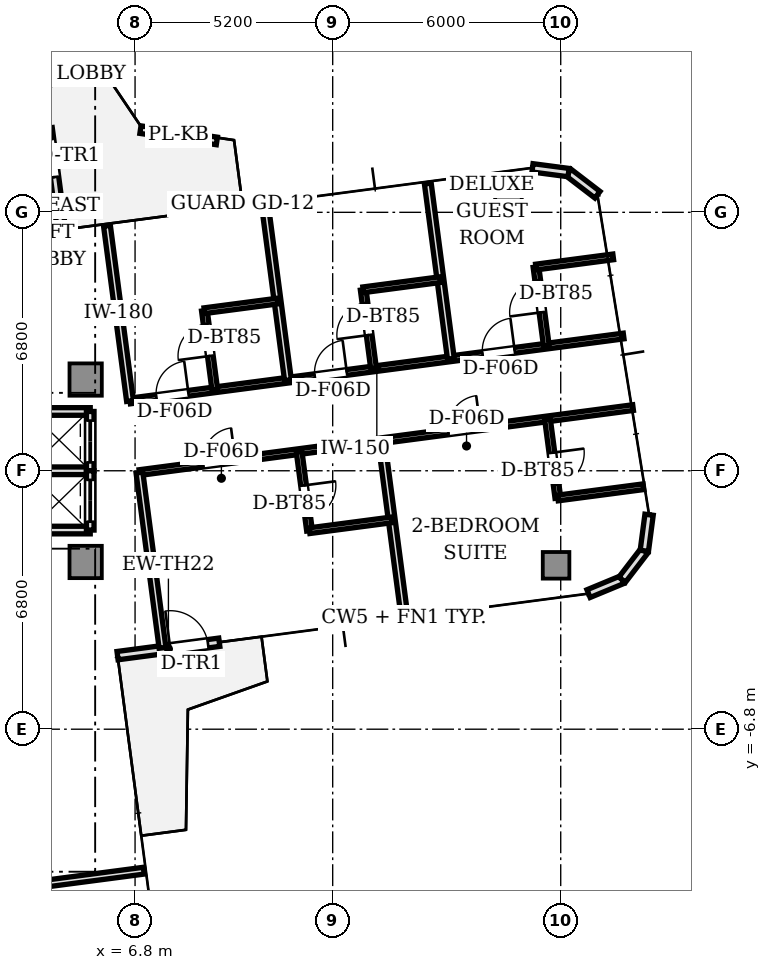
"""IFC4 building model, lengths in metres.
Left out: names, types, materials, properties, quantities, classifications, styles, units other than length and angle.
Written with IfcOpenShell. Run it as: python <this file> out.ifc"""

import sys

from ifc_helpers import new_model, si_unit, direction, frame, frame_2d, origin, origin_2d, place, context, subcontext, project, spatial, rectangle, extrude, source, transform, mapped, element, fill, save


model = new_model("IFC4")
c1 = context("Model", 3, precision=1e-05, world=origin(), true_north=direction((0.0, 1.0)))
c2 = subcontext(c1, "Body", "Model", "MODEL_VIEW")
j1 = project(units=[si_unit("LENGTHUNIT", "METRE"), si_unit("PLANEANGLEUNIT", "RADIAN")], contexts=[c1])
p1 = place(None, origin())
s1 = spatial("IfcSite", under=j1, at=p1, CompositionType="ELEMENT")
p2 = place(p1, origin())
s2 = spatial("IfcBuilding", under=s1, at=p2, CompositionType="ELEMENT")
p3 = place(p2, frame((0.0, 0.0, 206.5)))
s3 = spatial("IfcBuildingStorey", under=s2, at=p3, CompositionType="ELEMENT", Elevation=206.5)
m1 = source(origin(), c2, "Body", "SweptSolid", [
    extrude(rectangle(XDim=0.85, YDim=0.85, at=origin_2d()), origin(), (0.0, 0.0, 1.0), 3.11),
])
for number, where, z_axis, x_axis in (
    (1, (5.5, 2.4, 0.0), (0.0, 0.0, 1.0), (1.0, 0.0, 0.0)),
    (2, (5.5, -2.4, 0.0), (0.0, 0.0, 1.0), (1.0, 0.0, 0.0)),
):
    element("IfcColumn", number, at=place(p3, frame(where, z_axis=z_axis, x_axis=x_axis)), inside=s3, PredefinedType="COLUMN", context=c2, shape_type="MappedRepresentation", body=[
        mapped(m1, transform((0.0, 0.0, 0.0), scale=1.0)),
    ])
m2 = source(origin(), c2, "Body", "SweptSolid", [
    extrude(rectangle(XDim=0.7, YDim=0.7, at=origin_2d()), origin(), (0.0, 0.0, 1.0), 3.11),
])
for number, where, z_axis, x_axis in (
    (3, (17.878, -2.488, 0.0), (0.0, 0.0, 1.0), (1.0, 0.0, 0.0)),
    (4, (16.625, 7.03, 0.0), (0.0, 0.0, 1.0), (1.0, 0.0, 0.0)),
):
    element("IfcColumn", number, at=place(p3, frame(where, z_axis=z_axis, x_axis=x_axis)), inside=s3, PredefinedType="COLUMN", context=c2, shape_type="MappedRepresentation", body=[
        mapped(m2, transform((0.0, 0.0, 0.0), scale=1.0)),
    ])
p4 = place(p3, frame((6.339, -4.864, 0.0), z_axis=(0.0, 0.0, 1.0), x_axis=(0.991439824936, 0.130564442062, 0.0)))
e5 = element("IfcWall", 5, at=p4, inside=s3, PredefinedType="STANDARD", context=c2, shape_type="SweptSolid", body=[
    extrude(rectangle(XDim=2.7, YDim=0.22, at=frame_2d((1.35, 0.0))), origin(), (0.0, 0.0, 1.0), 3.11),
])
p5 = place(p4, frame((1.4, 0.0, 0.0)))
e6 = element("IfcOpeningElement", 6, at=p5, cuts=e5, PredefinedType="OPENING", context=c2, shape_type="SweptSolid", body=[
    extrude(rectangle(XDim=1.0, YDim=2.2, at=frame_2d((0.5, 1.1))), frame((0.0, 0.12, 0.0), z_axis=(0.0, -1.0, 0.0), x_axis=(1.0, 0.0, 0.0)), (0.0, 0.0, 1.0), 0.24),
])
for number, where, z_axis, x_axis in (
    (7, (18.732, -3.233, 0.0), (0.0, 0.0, 1.0), (0.924, 0.383, 0.0)),
    (8, (19.617, -2.866, 0.0), (0.0, 0.0, 1.0), (0.609, 0.793, 0.0)),
    (9, (20.2, -2.106, 0.0), (0.0, 0.0, 1.0), (0.131, 0.991, 0.0)),
):
    element("IfcWall", number, at=place(p3, frame(where, z_axis=z_axis, x_axis=x_axis)), inside=s3, PredefinedType="STANDARD", context=c2, shape_type="SweptSolid", body=[
        extrude(rectangle(XDim=0.958, YDim=0.22, at=frame_2d((0.479, 0.0))), origin(), (0.0, 0.0, 1.0), 3.11),
    ])
p6 = place(p3, frame((18.966, 7.263, 0.0), z_axis=(0.0, 0.0, 1.0), x_axis=(-0.793249178392, 0.608897151398, 0.0)))
e10 = element("IfcWall", 10, at=p6, inside=s3, PredefinedType="STANDARD", context=c2, shape_type="SweptSolid", body=[
    extrude(rectangle(XDim=0.958, YDim=0.22, at=frame_2d((0.479, 0.0))), origin(), (0.0, 0.0, 1.0), 3.11),
])
p7 = place(p3, frame((18.207, 7.846, 0.0), z_axis=(0.0, 0.0, 1.0), x_axis=(-0.991444747987, 0.130527053476, 0.0)))
e11 = element("IfcWall", 11, at=p7, inside=s3, PredefinedType="STANDARD", context=c2, shape_type="SweptSolid", body=[
    extrude(rectangle(XDim=0.958, YDim=0.22, at=frame_2d((0.479, 0.0))), origin(), (0.0, 0.0, 1.0), 3.11),
])
p8 = place(p3, frame((4.864, 6.339, 0.0), z_axis=(0.0, 0.0, 1.0), x_axis=(-0.130564442062, 0.991439824936, 0.0)))
e12 = element("IfcWall", 12, at=p8, inside=s3, PredefinedType="STANDARD", context=c2, shape_type="SweptSolid", body=[
    extrude(rectangle(XDim=2.7, YDim=0.22, at=frame_2d((1.35, 0.0))), origin(), (0.0, 0.0, 1.0), 3.11),
])
p9 = place(p8, frame((1.4, 0.0, 0.0)))
e13 = element("IfcOpeningElement", 13, at=p9, cuts=e12, PredefinedType="OPENING", context=c2, shape_type="SweptSolid", body=[
    extrude(rectangle(XDim=1.0, YDim=2.2, at=frame_2d((0.5, 1.1))), frame((0.0, 0.12, 0.0), z_axis=(0.0, -1.0, 0.0), x_axis=(1.0, 0.0, 0.0)), (0.0, 0.0, 1.0), 0.24),
])
p10 = place(p3, frame((8.952, 8.678, 0.0), z_axis=(0.0, 0.0, 1.0), x_axis=(-0.989233117848, 0.146348346598, 0.0)))
e14 = element("IfcWall", 14, at=p10, inside=s3, PredefinedType="PARAPET", context=c2, shape_type="SweptSolid", body=[
    extrude(rectangle(XDim=2.032, YDim=0.2, at=frame_2d((1.016, 0.0))), origin(), (0.0, 0.0, 1.0), 0.65),
])
for number, where, z_axis, x_axis in (
    (15, (3.98, 1.56, 0.0), (0.0, 0.0, 1.0), (1.0, 0.0, 0.0)),
    (16, (3.98, -1.56, 0.0), (0.0, 0.0, 1.0), (1.0, 0.0, 0.0)),
    (17, (3.98, 0.0, 0.0), (0.0, 0.0, 1.0), (1.0, 0.0, 0.0)),
):
    element("IfcWall", number, at=place(p3, frame(where, z_axis=z_axis, x_axis=x_axis)), inside=s3, PredefinedType="SOLIDWALL", context=c2, shape_type="SweptSolid", body=[
        extrude(rectangle(XDim=1.64, YDim=0.2, at=frame_2d((0.82, 0.0))), origin(), (0.0, 0.0, 1.0), 2.66),
    ])
p11 = place(p3, frame((5.62, 0.0, 0.0), z_axis=(0.0, 0.0, 1.0), x_axis=(0.0, 1.0, 0.0)))
e18 = element("IfcWall", 18, at=p11, inside=s3, PredefinedType="SOLIDWALL", context=c2, shape_type="SweptSolid", body=[
    extrude(rectangle(XDim=1.56, YDim=0.2, at=frame_2d((0.78, 0.0))), origin(), (0.0, 0.0, 1.0), 2.66),
])
p12 = place(p11, frame((0.22, 0.0, 0.0)))
e19 = element("IfcOpeningElement", 19, at=p12, cuts=e18, PredefinedType="OPENING", context=c2, shape_type="SweptSolid", body=[
    extrude(rectangle(XDim=1.1, YDim=2.2, at=frame_2d((0.55, 1.1))), frame((0.0, 0.11, 0.0), z_axis=(0.0, -1.0, 0.0), x_axis=(1.0, 0.0, 0.0)), (0.0, 0.0, 1.0), 0.22),
])
p13 = place(p3, frame((5.62, -1.56, 0.0), z_axis=(0.0, 0.0, 1.0), x_axis=(0.0, 1.0, 0.0)))
e20 = element("IfcWall", 20, at=p13, inside=s3, PredefinedType="SOLIDWALL", context=c2, shape_type="SweptSolid", body=[
    extrude(rectangle(XDim=1.56, YDim=0.2, at=frame_2d((0.78, 0.0))), origin(), (0.0, 0.0, 1.0), 2.66),
])
p14 = place(p13, frame((0.22, 0.0, 0.0)))
e21 = element("IfcOpeningElement", 21, at=p14, cuts=e20, PredefinedType="OPENING", context=c2, shape_type="SweptSolid", body=[
    extrude(rectangle(XDim=1.1, YDim=2.2, at=frame_2d((0.55, 1.1))), frame((0.0, 0.11, 0.0), z_axis=(0.0, -1.0, 0.0), x_axis=(1.0, 0.0, 0.0)), (0.0, 0.0, 1.0), 0.22),
])
p15 = place(p3, frame((6.667, 1.836, 0.0), z_axis=(0.0, 0.0, 1.0), x_axis=(0.991444016182, 0.130532611928, 0.0)))
e22 = element("IfcWall", 22, at=p15, inside=s3, PredefinedType="PARTITIONING", context=c2, shape_type="SweptSolid", body=[
    extrude(rectangle(XDim=13.1, YDim=0.15, at=frame_2d((6.55, 0.0))), origin(), (0.0, 0.0, 1.0), 2.66),
])
p16 = place(p15, frame((0.7, 0.0, 0.0)))
e23 = element("IfcOpeningElement", 23, at=p16, cuts=e22, PredefinedType="OPENING", context=c2, shape_type="SweptSolid", body=[
    extrude(rectangle(XDim=0.85, YDim=2.1, at=frame_2d((0.425, 1.05))), frame((0.0, 0.085, 0.0), z_axis=(0.0, -1.0, 0.0), x_axis=(1.0, 0.0, 0.0)), (0.0, 0.0, 1.0), 0.17),
])
p17 = place(p15, frame((4.904, 0.0, 0.0)))
e24 = element("IfcOpeningElement", 24, at=p17, cuts=e22, PredefinedType="OPENING", context=c2, shape_type="SweptSolid", body=[
    extrude(rectangle(XDim=0.85, YDim=2.1, at=frame_2d((0.425, 1.05))), frame((0.0, 0.085, 0.0), z_axis=(0.0, -1.0, 0.0), x_axis=(1.0, 0.0, 0.0)), (0.0, 0.0, 1.0), 0.17),
])
p18 = place(p15, frame((9.357, 0.0, 0.0)))
e25 = element("IfcOpeningElement", 25, at=p18, cuts=e22, PredefinedType="OPENING", context=c2, shape_type="SweptSolid", body=[
    extrude(rectangle(XDim=0.85, YDim=2.1, at=frame_2d((0.425, 1.05))), frame((0.0, 0.085, 0.0), z_axis=(0.0, -1.0, 0.0), x_axis=(1.0, 0.0, 0.0)), (0.0, 0.0, 1.0), 0.17),
])
p19 = place(p3, frame((6.915, -0.048, 0.0), z_axis=(0.0, 0.0, 1.0), x_axis=(0.991444333722, 0.130530200068, 0.0)))
e26 = element("IfcWall", 26, at=p19, inside=s3, PredefinedType="PARTITIONING", context=c2, shape_type="SweptSolid", body=[
    extrude(rectangle(XDim=13.1, YDim=0.15, at=frame_2d((6.55, 0.0))), origin(), (0.0, 0.0, 1.0), 2.66),
])
p20 = place(p19, frame((1.693, 0.0, 0.0)))
e27 = element("IfcOpeningElement", 27, at=p20, cuts=e26, PredefinedType="OPENING", context=c2, shape_type="SweptSolid", body=[
    extrude(rectangle(XDim=0.85, YDim=2.1, at=frame_2d((0.425, 1.05))), frame((0.0, 0.085, 0.0), z_axis=(0.0, -1.0, 0.0), x_axis=(1.0, 0.0, 0.0)), (0.0, 0.0, 1.0), 0.17),
])
p21 = place(p19, frame((8.199, 0.0, 0.0)))
e28 = element("IfcOpeningElement", 28, at=p21, cuts=e26, PredefinedType="OPENING", context=c2, shape_type="SweptSolid", body=[
    extrude(rectangle(XDim=0.85, YDim=2.1, at=frame_2d((0.425, 1.05))), frame((0.0, 0.085, 0.0), z_axis=(0.0, -1.0, 0.0), x_axis=(1.0, 0.0, 0.0)), (0.0, 0.0, 1.0), 0.17),
])
p22 = place(p3, frame((6.667, 1.836, 0.0), z_axis=(0.0, 0.0, 1.0), x_axis=(-0.13051970184, 0.991445715827, 0.0)))
e29 = element("IfcWall", 29, at=p22, inside=s3, PredefinedType="PARTITIONING", context=c2, shape_type="SweptSolid", body=[
    extrude(rectangle(XDim=4.65, YDim=0.18, at=frame_2d((2.325, 0.0))), origin(), (0.0, 0.0, 1.0), 2.66),
])
p23 = place(p3, frame((7.522, -4.658, 0.0), z_axis=(0.0, 0.0, 1.0), x_axis=(-0.130526496103, 0.991444821367, 0.0)))
e30 = element("IfcWall", 30, at=p23, inside=s3, PredefinedType="PARTITIONING", context=c2, shape_type="SweptSolid", body=[
    extrude(rectangle(XDim=4.65, YDim=0.18, at=frame_2d((2.325, 0.0))), origin(), (0.0, 0.0, 1.0), 2.66),
])
p24 = place(p3, frame((10.823, 2.383, 0.0), z_axis=(0.0, 0.0, 1.0), x_axis=(-0.13051970184, 0.991445715827, 0.0)))
e31 = element("IfcWall", 31, at=p24, inside=s3, PredefinedType="PARTITIONING", context=c2, shape_type="SweptSolid", body=[
    extrude(rectangle(XDim=4.65, YDim=0.18, at=frame_2d((2.325, 0.0))), origin(), (0.0, 0.0, 1.0), 2.66),
])
p25 = place(p3, frame((8.898, 2.13, 0.0), z_axis=(0.0, 0.0, 1.0), x_axis=(-0.130556761174, 0.991440836415, 0.0)))
e32 = element("IfcWall", 32, at=p25, inside=s3, PredefinedType="PARTITIONING", context=c2, shape_type="SweptSolid", body=[
    extrude(rectangle(XDim=2.1, YDim=0.15, at=frame_2d((1.05, 0.0))), origin(), (0.0, 0.0, 1.0), 2.66),
])
p26 = place(p25, frame((0.9, 0.0, 0.0)))
e33 = element("IfcOpeningElement", 33, at=p26, cuts=e32, PredefinedType="OPENING", context=c2, shape_type="SweptSolid", body=[
    extrude(rectangle(XDim=0.85, YDim=2.1, at=frame_2d((0.425, 1.05))), frame((0.0, 0.085, 0.0), z_axis=(0.0, -1.0, 0.0), x_axis=(1.0, 0.0, 0.0)), (0.0, 0.0, 1.0), 0.17),
])
p27 = place(p3, frame((8.624, 4.212, 0.0), z_axis=(0.0, 0.0, 1.0), x_axis=(0.991448303632, 0.130500043009, 0.0)))
e34 = element("IfcWall", 34, at=p27, inside=s3, PredefinedType="PARTITIONING", context=c2, shape_type="SweptSolid", body=[
    extrude(rectangle(XDim=1.942, YDim=0.15, at=frame_2d((0.971, 0.0))), origin(), (0.0, 0.0, 1.0), 2.66),
])
p28 = place(p3, frame((15.11, 2.948, 0.0), z_axis=(0.0, 0.0, 1.0), x_axis=(-0.130526496103, 0.991444821367, 0.0)))
e35 = element("IfcWall", 35, at=p28, inside=s3, PredefinedType="PARTITIONING", context=c2, shape_type="SweptSolid", body=[
    extrude(rectangle(XDim=4.65, YDim=0.18, at=frame_2d((2.325, 0.0))), origin(), (0.0, 0.0, 1.0), 2.66),
])
p29 = place(p3, frame((13.077, 2.68, 0.0), z_axis=(0.0, 0.0, 1.0), x_axis=(-0.130541714651, 0.991442817683, 0.0)))
e36 = element("IfcWall", 36, at=p29, inside=s3, PredefinedType="PARTITIONING", context=c2, shape_type="SweptSolid", body=[
    extrude(rectangle(XDim=2.1, YDim=0.15, at=frame_2d((1.05, 0.0))), origin(), (0.0, 0.0, 1.0), 2.66),
])
p30 = place(p29, frame((0.9, 0.0, 0.0)))
e37 = element("IfcOpeningElement", 37, at=p30, cuts=e36, PredefinedType="OPENING", context=c2, shape_type="SweptSolid", body=[
    extrude(rectangle(XDim=0.85, YDim=2.1, at=frame_2d((0.425, 1.05))), frame((0.0, 0.085, 0.0), z_axis=(0.0, -1.0, 0.0), x_axis=(1.0, 0.0, 0.0)), (0.0, 0.0, 1.0), 0.17),
])
p31 = place(p3, frame((12.803, 4.762, 0.0), z_axis=(0.0, 0.0, 1.0), x_axis=(0.991460374844, 0.130408301556, 0.0)))
e38 = element("IfcWall", 38, at=p31, inside=s3, PredefinedType="PARTITIONING", context=c2, shape_type="SweptSolid", body=[
    extrude(rectangle(XDim=2.05, YDim=0.15, at=frame_2d((1.025, 0.0))), origin(), (0.0, 0.0, 1.0), 2.66),
])
p32 = place(p3, frame((17.623, 3.278, 0.0), z_axis=(0.0, 0.0, 1.0), x_axis=(-0.13044248305, 0.9914558783, 0.0)))
e39 = element("IfcWall", 39, at=p32, inside=s3, PredefinedType="PARTITIONING", context=c2, shape_type="SweptSolid", body=[
    extrude(rectangle(XDim=2.1, YDim=0.15, at=frame_2d((1.05, 0.0))), origin(), (0.0, 0.0, 1.0), 2.66),
])
p33 = place(p32, frame((0.9, 0.0, 0.0)))
e40 = element("IfcOpeningElement", 40, at=p33, cuts=e39, PredefinedType="OPENING", context=c2, shape_type="SweptSolid", body=[
    extrude(rectangle(XDim=0.85, YDim=2.1, at=frame_2d((0.425, 1.05))), frame((0.0, 0.085, 0.0), z_axis=(0.0, -1.0, 0.0), x_axis=(1.0, 0.0, 0.0)), (0.0, 0.0, 1.0), 0.17),
])
p34 = place(p3, frame((17.349, 5.36, 0.0), z_axis=(0.0, 0.0, 1.0), x_axis=(0.991442940586, 0.130540781221, 0.0)))
e41 = element("IfcWall", 41, at=p34, inside=s3, PredefinedType="PARTITIONING", context=c2, shape_type="SweptSolid", body=[
    extrude(rectangle(XDim=2.05, YDim=0.15, at=frame_2d((1.025, 0.0))), origin(), (0.0, 0.0, 1.0), 2.66),
])
p35 = place(p3, frame((13.28, 0.79, 0.0), z_axis=(0.0, 0.0, 1.0), x_axis=(0.130526496103, -0.991444821367, 0.0)))
e42 = element("IfcWall", 42, at=p35, inside=s3, PredefinedType="PARTITIONING", context=c2, shape_type="SweptSolid", body=[
    extrude(rectangle(XDim=4.65, YDim=0.18, at=frame_2d((2.325, 0.0))), origin(), (0.0, 0.0, 1.0), 2.66),
])
p36 = place(p3, frame((11.116, 0.505, 0.0), z_axis=(0.0, 0.0, 1.0), x_axis=(0.130541714651, -0.991442817683, 0.0)))
e43 = element("IfcWall", 43, at=p36, inside=s3, PredefinedType="PARTITIONING", context=c2, shape_type="SweptSolid", body=[
    extrude(rectangle(XDim=2.1, YDim=0.15, at=frame_2d((1.05, 0.0))), origin(), (0.0, 0.0, 1.0), 2.66),
])
p37 = place(p36, frame((0.9, 0.0, 0.0)))
e44 = element("IfcOpeningElement", 44, at=p37, cuts=e43, PredefinedType="OPENING", context=c2, shape_type="SweptSolid", body=[
    extrude(rectangle(XDim=0.85, YDim=2.1, at=frame_2d((0.425, 1.05))), frame((0.0, 0.085, 0.0), z_axis=(0.0, -1.0, 0.0), x_axis=(1.0, 0.0, 0.0)), (0.0, 0.0, 1.0), 0.17),
])
p38 = place(p3, frame((11.39, -1.577, 0.0), z_axis=(0.0, 0.0, 1.0), x_axis=(0.991438674405, 0.130573178313, 0.0)))
e45 = element("IfcWall", 45, at=p38, inside=s3, PredefinedType="PARTITIONING", context=c2, shape_type="SweptSolid", body=[
    extrude(rectangle(XDim=2.182, YDim=0.15, at=frame_2d((1.091, 0.0))), origin(), (0.0, 0.0, 1.0), 2.66),
])
p39 = place(p3, frame((17.651, 1.365, 0.0), z_axis=(0.0, 0.0, 1.0), x_axis=(0.13044248305, -0.9914558783, 0.0)))
e46 = element("IfcWall", 46, at=p39, inside=s3, PredefinedType="PARTITIONING", context=c2, shape_type="SweptSolid", body=[
    extrude(rectangle(XDim=2.1, YDim=0.15, at=frame_2d((1.05, 0.0))), origin(), (0.0, 0.0, 1.0), 2.63),
])
p40 = place(p39, frame((0.9, 0.0, 0.0)))
e47 = element("IfcOpeningElement", 47, at=p40, cuts=e46, PredefinedType="OPENING", context=c2, shape_type="SweptSolid", body=[
    extrude(rectangle(XDim=0.85, YDim=2.1, at=frame_2d((0.425, 1.05))), frame((0.0, 0.085, 0.0), z_axis=(0.0, -1.0, 0.0), x_axis=(1.0, 0.0, 0.0)), (0.0, 0.0, 1.0), 0.17),
])
p41 = place(p3, frame((17.925, -0.717, 0.0), z_axis=(0.0, 0.0, 1.0), x_axis=(0.991441490391, 0.130551794822, 0.0)))
e48 = element("IfcWall", 48, at=p41, inside=s3, PredefinedType="PARTITIONING", context=c2, shape_type="SweptSolid", body=[
    extrude(rectangle(XDim=2.272, YDim=0.15, at=frame_2d((1.136, 0.0))), origin(), (0.0, 0.0, 1.0), 2.66),
])
p42 = place(p3, frame((2.423, -11.129, 0.0), z_axis=(0.0, 0.0, 1.0), x_axis=(0.991445715827, 0.13051970184, 0.0)))
e49 = element("IfcWall", 49, at=p42, inside=s3, PredefinedType="PARTITIONING", context=c2, shape_type="SweptSolid", body=[
    extrude(rectangle(XDim=4.65, YDim=0.18, at=frame_2d((2.325, 0.0))), origin(), (0.0, 0.0, 1.0), 2.66),
])
m3 = source(origin(), c2, "Body", "SweptSolid", [
    extrude(rectangle(XDim=1.0, YDim=0.05, at=origin_2d()), origin(), (0.0, 0.0, 1.0), 2.2),
])
p43 = place(p5, frame((0.5, 0.0, 0.0)))
e50 = element("IfcDoor", 50, at=p43, inside=s3, OperationType="SINGLE_SWING_LEFT", PredefinedType="DOOR", context=c2, shape_type="MappedRepresentation", body=[
    mapped(m3, transform((0.0, 0.0, 0.0), scale=1.0)),
])
fill(e6, e50)
p44 = place(p9, frame((0.5, 0.0, 0.0)))
e51 = element("IfcDoor", 51, at=p44, inside=s3, OperationType="SINGLE_SWING_LEFT", PredefinedType="DOOR", context=c2, shape_type="MappedRepresentation", body=[
    mapped(m3, transform((0.0, 0.0, 0.0), scale=1.0)),
])
fill(e13, e51)
m4 = source(origin(), c2, "Body", "SweptSolid", [
    extrude(rectangle(XDim=1.1, YDim=0.05, at=origin_2d()), origin(), (0.0, 0.0, 1.0), 2.2),
])
p45 = place(p12, frame((0.55, 0.0, 0.0)))
e52 = element("IfcDoor", 52, at=p45, inside=s3, OperationType="DOUBLE_DOOR_SLIDING", PredefinedType="DOOR", context=c2, shape_type="MappedRepresentation", body=[
    mapped(m4, transform((0.0, 0.0, 0.0), scale=1.0)),
])
fill(e19, e52)
p46 = place(p14, frame((0.55, 0.0, 0.0)))
e53 = element("IfcDoor", 53, at=p46, inside=s3, OperationType="DOUBLE_DOOR_SLIDING", PredefinedType="DOOR", context=c2, shape_type="MappedRepresentation", body=[
    mapped(m4, transform((0.0, 0.0, 0.0), scale=1.0)),
])
fill(e21, e53)
m5 = source(origin(), c2, "Body", "SweptSolid", [
    extrude(rectangle(XDim=0.85, YDim=0.05, at=origin_2d()), origin(), (0.0, 0.0, 1.0), 2.1),
])
p47 = place(p26, frame((0.425, 0.0, 0.0)))
e54 = element("IfcDoor", 54, at=p47, inside=s3, OperationType="SINGLE_SWING_LEFT", PredefinedType="DOOR", context=c2, shape_type="MappedRepresentation", body=[
    mapped(m5, transform((0.0, 0.0, 0.0), scale=1.0)),
])
fill(e33, e54)
p48 = place(p16, frame((0.425, 0.0, 0.0)))
e55 = element("IfcDoor", 55, at=p48, inside=s3, OperationType="SINGLE_SWING_RIGHT", PredefinedType="DOOR", context=c2, shape_type="MappedRepresentation", body=[
    mapped(m5, transform((0.0, 0.0, 0.0), scale=1.0)),
])
fill(e23, e55)
p49 = place(p30, frame((0.425, 0.0, 0.0)))
e56 = element("IfcDoor", 56, at=p49, inside=s3, OperationType="SINGLE_SWING_LEFT", PredefinedType="DOOR", context=c2, shape_type="MappedRepresentation", body=[
    mapped(m5, transform((0.0, 0.0, 0.0), scale=1.0)),
])
fill(e37, e56)
p50 = place(p17, frame((0.425, 0.0, 0.0)))
e57 = element("IfcDoor", 57, at=p50, inside=s3, OperationType="SINGLE_SWING_RIGHT", PredefinedType="DOOR", context=c2, shape_type="MappedRepresentation", body=[
    mapped(m5, transform((0.0, 0.0, 0.0), scale=1.0)),
])
fill(e24, e57)
p51 = place(p33, frame((0.425, 0.0, 0.0)))
e58 = element("IfcDoor", 58, at=p51, inside=s3, OperationType="SINGLE_SWING_LEFT", PredefinedType="DOOR", context=c2, shape_type="MappedRepresentation", body=[
    mapped(m5, transform((0.0, 0.0, 0.0), scale=1.0)),
])
fill(e40, e58)
p52 = place(p18, frame((0.425, 0.0, 0.0)))
e59 = element("IfcDoor", 59, at=p52, inside=s3, OperationType="SINGLE_SWING_RIGHT", PredefinedType="DOOR", context=c2, shape_type="MappedRepresentation", body=[
    mapped(m5, transform((0.0, 0.0, 0.0), scale=1.0)),
])
fill(e25, e59)
p53 = place(p37, frame((0.425, 0.0, 0.0)))
e60 = element("IfcDoor", 60, at=p53, inside=s3, OperationType="SINGLE_SWING_LEFT", PredefinedType="DOOR", context=c2, shape_type="MappedRepresentation", body=[
    mapped(m5, transform((0.0, 0.0, 0.0), scale=1.0)),
])
fill(e44, e60)
p54 = place(p20, frame((0.425, 0.0, 0.0)))
e61 = element("IfcDoor", 61, at=p54, inside=s3, OperationType="SINGLE_SWING_RIGHT", PredefinedType="DOOR", context=c2, shape_type="MappedRepresentation", body=[
    mapped(m5, transform((0.0, 0.0, 0.0), scale=1.0)),
])
fill(e27, e61)
p55 = place(p40, frame((0.425, 0.0, 0.0)))
e62 = element("IfcDoor", 62, at=p55, inside=s3, OperationType="SINGLE_SWING_LEFT", PredefinedType="DOOR", context=c2, shape_type="MappedRepresentation", body=[
    mapped(m5, transform((0.0, 0.0, 0.0), scale=1.0)),
])
fill(e47, e62)
p56 = place(p21, frame((0.425, 0.0, 0.0)))
e63 = element("IfcDoor", 63, at=p56, inside=s3, OperationType="SINGLE_SWING_RIGHT", PredefinedType="DOOR", context=c2, shape_type="MappedRepresentation", body=[
    mapped(m5, transform((0.0, 0.0, 0.0), scale=1.0)),
])
fill(e28, e63)
save(model, sys.argv[1])
